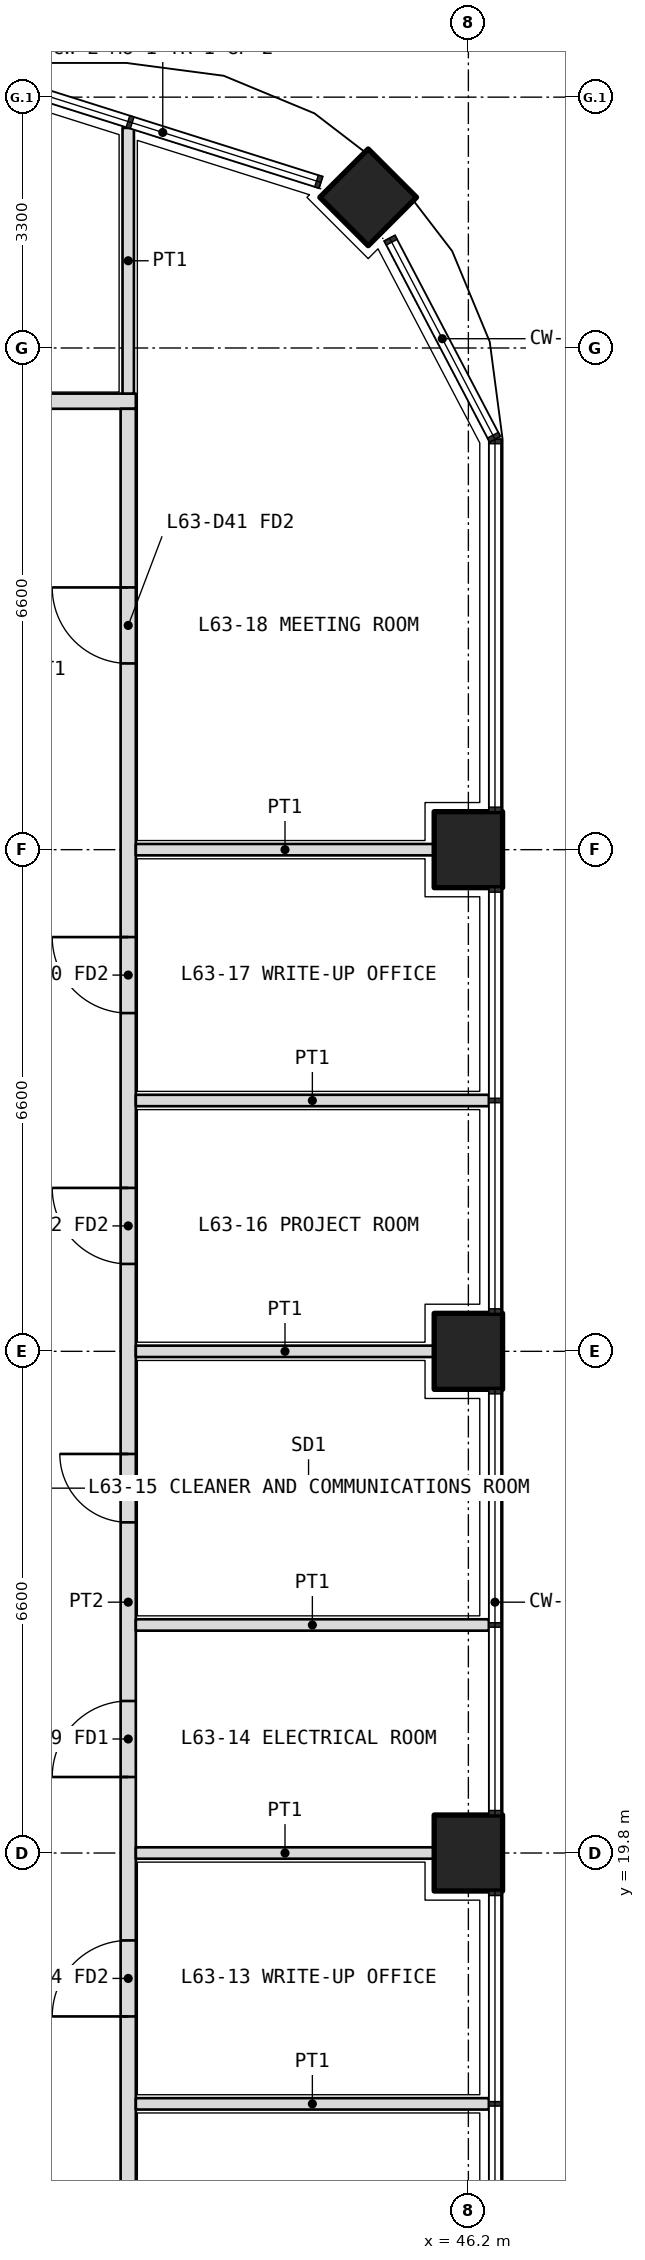
"""IFC4 building model, lengths in metres.
Left out: names, types, materials, properties, quantities, classifications, styles, units other than length and angle.
Written with IfcOpenShell. Run it as: python <this file> out.ifc"""

import sys

from ifc_helpers import new_model, si_unit, direction, frame, frame_2d, origin, origin_2d, place, context, subcontext, project, spatial, rectangle, extrude, element, fill, save


model = new_model("IFC4")
c1 = context("Model", 3, precision=1e-05, world=origin(), true_north=direction((0.0, 1.0)))
c2 = subcontext(c1, "Body", "Model", "MODEL_VIEW")
j1 = project(units=[si_unit("LENGTHUNIT", "METRE"), si_unit("PLANEANGLEUNIT", "RADIAN")], contexts=[c1])
p1 = place(None, origin())
s1 = spatial("IfcSite", under=j1, at=p1, CompositionType="ELEMENT")
p2 = place(p1, origin())
s2 = spatial("IfcBuilding", under=s1, at=p2, CompositionType="ELEMENT")
p3 = place(p2, frame((0.0, 0.0, 275.4)))
s3 = spatial("IfcBuildingStorey", under=s2, at=p3, CompositionType="ELEMENT", Elevation=275.4)
p4 = place(p3, frame((44.882, 41.582, 0.0), z_axis=(0.0, 0.0, 1.0), x_axis=(0.707106781187, 0.707106781187, 0.0)))
e1 = element("IfcColumn", 1, at=p4, inside=s3, PredefinedType="COLUMN", context=c2, shape_type="SweptSolid", body=[
    extrude(rectangle(XDim=0.9, YDim=0.9, at=origin_2d()), origin(), (0.0, 0.0, 1.0), 4.2),
])
for number, where, z_axis, x_axis in (
    (2, (46.2, 19.8, 0.0), (0.0, 0.0, 1.0), (0.0, 1.0, 0.0)),
    (3, (46.2, 26.4, 0.0), (0.0, 0.0, 1.0), (0.0, 1.0, 0.0)),
    (4, (46.2, 33.0, 0.0), (0.0, 0.0, 1.0), (0.0, 1.0, 0.0)),
):
    element("IfcColumn", number, at=place(p3, frame(where, z_axis=z_axis, x_axis=x_axis)), inside=s3, PredefinedType="COLUMN", context=c2, shape_type="SweptSolid", body=[
        extrude(rectangle(XDim=1.0, YDim=0.9, at=origin_2d()), origin(), (0.0, 0.0, 1.0), 4.2),
    ])
p5 = place(p3, frame((10.975, 38.9, 0.0), z_axis=(0.0, 0.0, 1.0), x_axis=(1.0, 0.0, 0.0)))
e5 = element("IfcWall", 5, at=p5, inside=s3, PredefinedType="PARTITIONING", context=c2, shape_type="SweptSolid", body=[
    extrude(rectangle(XDim=30.85, YDim=0.2, at=frame_2d((15.425, 0.0))), origin(), (0.0, 0.0, 1.0), 3.0),
])
p6 = place(p5, frame((2.312, 0.0, 0.0)))
e6 = element("IfcOpeningElement", 6, at=p6, cuts=e5, PredefinedType="OPENING", context=c2, shape_type="SweptSolid", body=[
    extrude(rectangle(XDim=1.0, YDim=2.1, at=frame_2d((0.5, 1.05))), frame((0.0, 0.11, 0.0), z_axis=(0.0, -1.0, 0.0), x_axis=(1.0, 0.0, 0.0)), (0.0, 0.0, 1.0), 0.22),
])
p7 = place(p5, frame((7.125, 0.0, 0.0)))
e7 = element("IfcOpeningElement", 7, at=p7, cuts=e5, PredefinedType="OPENING", context=c2, shape_type="SweptSolid", body=[
    extrude(rectangle(XDim=1.0, YDim=2.1, at=frame_2d((0.5, 1.05))), frame((0.0, 0.11, 0.0), z_axis=(0.0, -1.0, 0.0), x_axis=(1.0, 0.0, 0.0)), (0.0, 0.0, 1.0), 0.22),
])
p8 = place(p5, frame((10.425, 0.0, 0.0)))
e8 = element("IfcOpeningElement", 8, at=p8, cuts=e5, PredefinedType="OPENING", context=c2, shape_type="SweptSolid", body=[
    extrude(rectangle(XDim=1.0, YDim=2.1, at=frame_2d((0.5, 1.05))), frame((0.0, 0.11, 0.0), z_axis=(0.0, -1.0, 0.0), x_axis=(1.0, 0.0, 0.0)), (0.0, 0.0, 1.0), 0.22),
])
p9 = place(p5, frame((13.275, 0.0, 0.0)))
e9 = element("IfcOpeningElement", 9, at=p9, cuts=e5, PredefinedType="OPENING", context=c2, shape_type="SweptSolid", body=[
    extrude(rectangle(XDim=1.0, YDim=2.1, at=frame_2d((0.5, 1.05))), frame((0.0, 0.11, 0.0), z_axis=(0.0, -1.0, 0.0), x_axis=(1.0, 0.0, 0.0)), (0.0, 0.0, 1.0), 0.22),
])
p10 = place(p5, frame((22.587, 0.0, 0.0)))
e10 = element("IfcOpeningElement", 10, at=p10, cuts=e5, PredefinedType="OPENING", context=c2, shape_type="SweptSolid", body=[
    extrude(rectangle(XDim=1.0, YDim=2.1, at=frame_2d((0.5, 1.05))), frame((0.0, 0.11, 0.0), z_axis=(0.0, -1.0, 0.0), x_axis=(1.0, 0.0, 0.0)), (0.0, 0.0, 1.0), 0.22),
])
p11 = place(p3, frame((41.725, 7.4, 0.0), z_axis=(0.0, 0.0, 1.0), x_axis=(0.0, 1.0, 0.0)))
e11 = element("IfcWall", 11, at=p11, inside=s3, PredefinedType="PARTITIONING", context=c2, shape_type="SweptSolid", body=[
    extrude(rectangle(XDim=31.4, YDim=0.2, at=frame_2d((15.7, 0.0))), origin(), (0.0, 0.0, 1.0), 3.0),
])
p12 = place(p11, frame((3.9, 0.0, 0.0)))
e12 = element("IfcOpeningElement", 12, at=p12, cuts=e11, PredefinedType="OPENING", context=c2, shape_type="SweptSolid", body=[
    extrude(rectangle(XDim=1.2, YDim=2.1, at=frame_2d((0.6, 1.05))), frame((0.0, 0.11, 0.0), z_axis=(0.0, -1.0, 0.0), x_axis=(1.0, 0.0, 0.0)), (0.0, 0.0, 1.0), 0.22),
])
p13 = place(p11, frame((10.25, 0.0, 0.0)))
e13 = element("IfcOpeningElement", 13, at=p13, cuts=e11, PredefinedType="OPENING", context=c2, shape_type="SweptSolid", body=[
    extrude(rectangle(XDim=1.0, YDim=2.1, at=frame_2d((0.5, 1.05))), frame((0.0, 0.11, 0.0), z_axis=(0.0, -1.0, 0.0), x_axis=(1.0, 0.0, 0.0)), (0.0, 0.0, 1.0), 0.22),
])
p14 = place(p11, frame((13.4, 0.0, 0.0)))
e14 = element("IfcOpeningElement", 14, at=p14, cuts=e11, PredefinedType="OPENING", context=c2, shape_type="SweptSolid", body=[
    extrude(rectangle(XDim=1.0, YDim=2.1, at=frame_2d((0.5, 1.05))), frame((0.0, 0.11, 0.0), z_axis=(0.0, -1.0, 0.0), x_axis=(1.0, 0.0, 0.0)), (0.0, 0.0, 1.0), 0.22),
])
p15 = place(p11, frame((16.75, 0.0, 0.0)))
e15 = element("IfcOpeningElement", 15, at=p15, cuts=e11, PredefinedType="OPENING", context=c2, shape_type="SweptSolid", body=[
    extrude(rectangle(XDim=0.9, YDim=2.1, at=frame_2d((0.45, 1.05))), frame((0.0, 0.11, 0.0), z_axis=(0.0, -1.0, 0.0), x_axis=(1.0, 0.0, 0.0)), (0.0, 0.0, 1.0), 0.22),
])
p16 = place(p11, frame((20.15, 0.0, 0.0)))
e16 = element("IfcOpeningElement", 16, at=p16, cuts=e11, PredefinedType="OPENING", context=c2, shape_type="SweptSolid", body=[
    extrude(rectangle(XDim=1.0, YDim=2.1, at=frame_2d((0.5, 1.05))), frame((0.0, 0.11, 0.0), z_axis=(0.0, -1.0, 0.0), x_axis=(1.0, 0.0, 0.0)), (0.0, 0.0, 1.0), 0.22),
])
p17 = place(p11, frame((23.45, 0.0, 0.0)))
e17 = element("IfcOpeningElement", 17, at=p17, cuts=e11, PredefinedType="OPENING", context=c2, shape_type="SweptSolid", body=[
    extrude(rectangle(XDim=1.0, YDim=2.1, at=frame_2d((0.5, 1.05))), frame((0.0, 0.11, 0.0), z_axis=(0.0, -1.0, 0.0), x_axis=(1.0, 0.0, 0.0)), (0.0, 0.0, 1.0), 0.22),
])
p18 = place(p11, frame((28.05, 0.0, 0.0)))
e18 = element("IfcOpeningElement", 18, at=p18, cuts=e11, PredefinedType="OPENING", context=c2, shape_type="SweptSolid", body=[
    extrude(rectangle(XDim=1.0, YDim=2.1, at=frame_2d((0.5, 1.05))), frame((0.0, 0.11, 0.0), z_axis=(0.0, -1.0, 0.0), x_axis=(1.0, 0.0, 0.0)), (0.0, 0.0, 1.0), 0.22),
])
p19 = place(p3, frame((41.725, 42.495, 0.0), z_axis=(0.0, 0.0, 1.0), x_axis=(0.0, -1.0, 0.0)))
e19 = element("IfcWall", 19, at=p19, inside=s3, PredefinedType="PARTITIONING", context=c2, shape_type="SweptSolid", body=[
    extrude(rectangle(XDim=3.495, YDim=0.15, at=frame_2d((1.748, 0.0))), origin(), (0.0, 0.0, 1.0), 2.7),
])
p20 = place(p3, frame((46.47, 22.8, 0.0), z_axis=(0.0, 0.0, 1.0), x_axis=(-1.0, 0.0, 0.0)))
e20 = element("IfcWall", 20, at=p20, inside=s3, PredefinedType="PARTITIONING", context=c2, shape_type="SweptSolid", body=[
    extrude(rectangle(XDim=4.645, YDim=0.15, at=frame_2d((2.323, 0.0))), origin(), (0.0, 0.0, 1.0), 2.7),
])
p21 = place(p3, frame((45.75, 26.4, 0.0), z_axis=(0.0, 0.0, 1.0), x_axis=(-1.0, 0.0, 0.0)))
e21 = element("IfcWall", 21, at=p21, inside=s3, PredefinedType="PARTITIONING", context=c2, shape_type="SweptSolid", body=[
    extrude(rectangle(XDim=3.925, YDim=0.15, at=frame_2d((1.962, 0.0))), origin(), (0.0, 0.0, 1.0), 3.0),
])
p22 = place(p3, frame((46.47, 16.5, 0.0), z_axis=(0.0, 0.0, 1.0), x_axis=(-1.0, 0.0, 0.0)))
e22 = element("IfcWall", 22, at=p22, inside=s3, PredefinedType="PARTITIONING", context=c2, shape_type="SweptSolid", body=[
    extrude(rectangle(XDim=4.645, YDim=0.15, at=frame_2d((2.323, 0.0))), origin(), (0.0, 0.0, 1.0), 2.7),
])
p23 = place(p3, frame((45.75, 19.8, 0.0), z_axis=(0.0, 0.0, 1.0), x_axis=(-1.0, 0.0, 0.0)))
e23 = element("IfcWall", 23, at=p23, inside=s3, PredefinedType="PARTITIONING", context=c2, shape_type="SweptSolid", body=[
    extrude(rectangle(XDim=3.925, YDim=0.15, at=frame_2d((1.962, 0.0))), origin(), (0.0, 0.0, 1.0), 3.0),
])
p24 = place(p3, frame((46.47, 29.7, 0.0), z_axis=(0.0, 0.0, 1.0), x_axis=(-1.0, 0.0, 0.0)))
e24 = element("IfcWall", 24, at=p24, inside=s3, PredefinedType="PARTITIONING", context=c2, shape_type="SweptSolid", body=[
    extrude(rectangle(XDim=4.645, YDim=0.15, at=frame_2d((2.323, 0.0))), origin(), (0.0, 0.0, 1.0), 2.7),
])
p25 = place(p3, frame((45.75, 33.0, 0.0), z_axis=(0.0, 0.0, 1.0), x_axis=(-1.0, 0.0, 0.0)))
e25 = element("IfcWall", 25, at=p25, inside=s3, PredefinedType="PARTITIONING", context=c2, shape_type="SweptSolid", body=[
    extrude(rectangle(XDim=3.925, YDim=0.15, at=frame_2d((1.962, 0.0))), origin(), (0.0, 0.0, 1.0), 3.0),
])
p26 = place(p13, origin())
e26 = element("IfcDoor", 26, at=p26, inside=s3, OperationType="SINGLE_SWING_LEFT", PredefinedType="DOOR", context=c2, shape_type="SweptSolid", body=[
    extrude(rectangle(XDim=1.0, YDim=2.1, at=frame_2d((0.5, 1.05))), frame((0.0, 0.025, 0.0), z_axis=(0.0, -1.0, 0.0), x_axis=(1.0, 0.0, 0.0)), (0.0, 0.0, 1.0), 0.05),
])
fill(e13, e26)
p27 = place(p14, origin())
e27 = element("IfcDoor", 27, at=p27, inside=s3, OperationType="SINGLE_SWING_LEFT", PredefinedType="DOOR", context=c2, shape_type="SweptSolid", body=[
    extrude(rectangle(XDim=1.0, YDim=2.1, at=frame_2d((0.5, 1.05))), frame((0.0, 0.025, 0.0), z_axis=(0.0, -1.0, 0.0), x_axis=(1.0, 0.0, 0.0)), (0.0, 0.0, 1.0), 0.05),
])
fill(e14, e27)
p28 = place(p15, origin())
e28 = element("IfcDoor", 28, at=p28, inside=s3, OperationType="SINGLE_SWING_RIGHT", PredefinedType="DOOR", context=c2, shape_type="SweptSolid", body=[
    extrude(rectangle(XDim=0.9, YDim=2.1, at=frame_2d((0.45, 1.05))), frame((0.0, 0.025, 0.0), z_axis=(0.0, -1.0, 0.0), x_axis=(1.0, 0.0, 0.0)), (0.0, 0.0, 1.0), 0.05),
])
fill(e15, e28)
p29 = place(p16, origin())
e29 = element("IfcDoor", 29, at=p29, inside=s3, OperationType="SINGLE_SWING_RIGHT", PredefinedType="DOOR", context=c2, shape_type="SweptSolid", body=[
    extrude(rectangle(XDim=1.0, YDim=2.1, at=frame_2d((0.5, 1.05))), frame((0.0, 0.025, 0.0), z_axis=(0.0, -1.0, 0.0), x_axis=(1.0, 0.0, 0.0)), (0.0, 0.0, 1.0), 0.05),
])
fill(e16, e29)
p30 = place(p17, origin())
e30 = element("IfcDoor", 30, at=p30, inside=s3, OperationType="SINGLE_SWING_RIGHT", PredefinedType="DOOR", context=c2, shape_type="SweptSolid", body=[
    extrude(rectangle(XDim=1.0, YDim=2.1, at=frame_2d((0.5, 1.05))), frame((0.0, 0.025, 0.0), z_axis=(0.0, -1.0, 0.0), x_axis=(1.0, 0.0, 0.0)), (0.0, 0.0, 1.0), 0.05),
])
fill(e17, e30)
p31 = place(p18, origin())
e31 = element("IfcDoor", 31, at=p31, inside=s3, OperationType="SINGLE_SWING_RIGHT", PredefinedType="DOOR", context=c2, shape_type="SweptSolid", body=[
    extrude(rectangle(XDim=1.0, YDim=2.1, at=frame_2d((0.5, 1.05))), frame((0.0, 0.025, 0.0), z_axis=(0.0, -1.0, 0.0), x_axis=(1.0, 0.0, 0.0)), (0.0, 0.0, 1.0), 0.05),
])
fill(e18, e31)
save(model, sys.argv[1])
